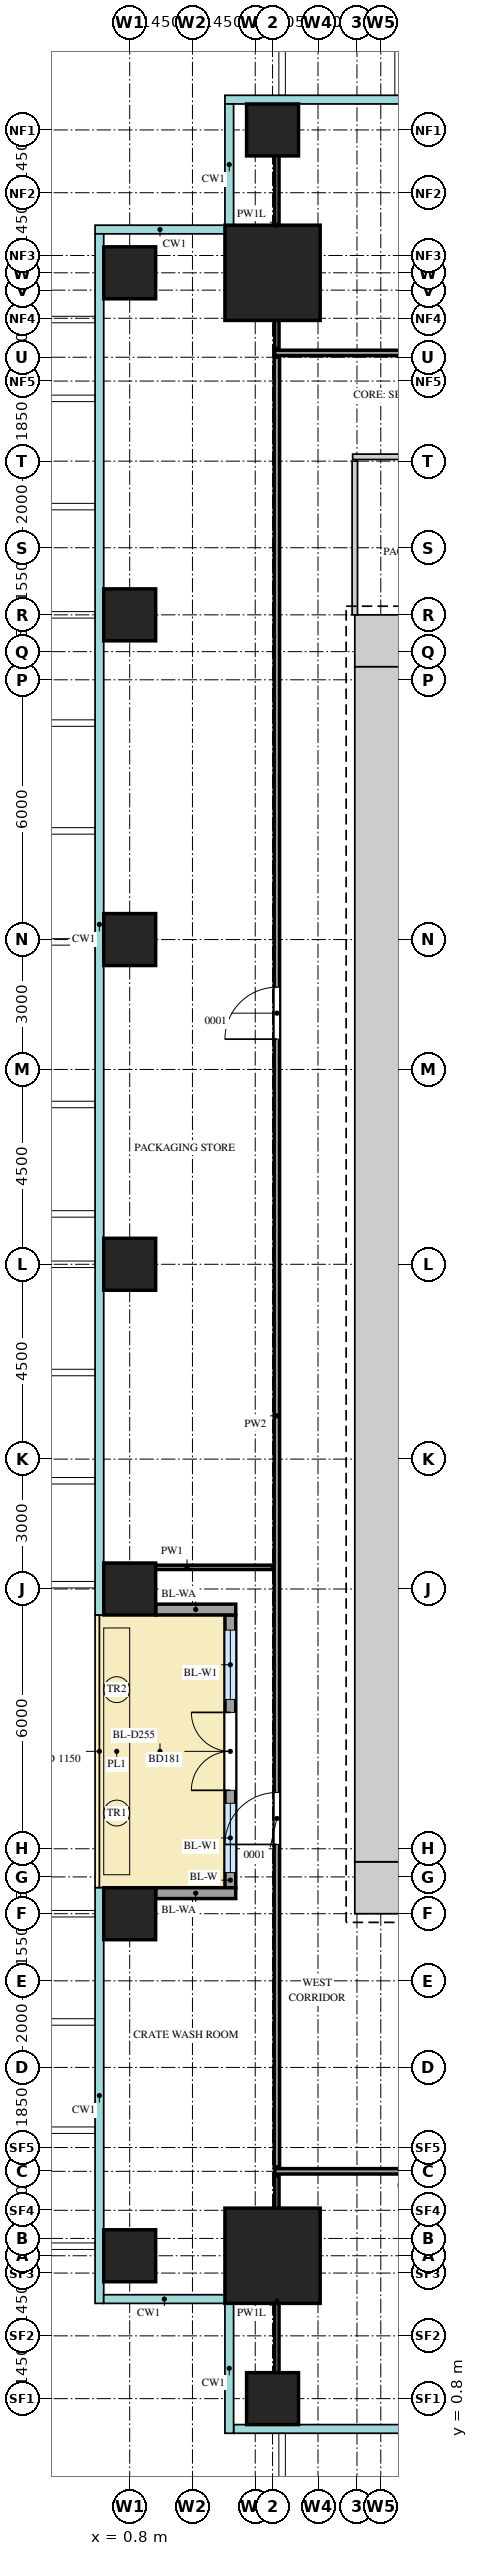
"""IFC4 building model, lengths in metres.
Left out: names, types, materials, properties, quantities, classifications, styles, units other than length and angle.
Written with IfcOpenShell. Run it as: python <this file> out.ifc"""

import sys

from ifc_helpers import new_model, si_unit, direction, frame, frame_2d, origin, origin_2d, place, context, subcontext, project, spatial, rectangle, extrude, source, transform, mapped, element, fill, save


model = new_model("IFC4")
c1 = context("Model", 3, precision=1e-05, world=origin(), true_north=direction((0.0, 1.0)))
c2 = subcontext(c1, "Body", "Model", "MODEL_VIEW")
j1 = project(units=[si_unit("LENGTHUNIT", "METRE"), si_unit("PLANEANGLEUNIT", "RADIAN")], contexts=[c1])
p1 = place(None, origin())
s1 = spatial("IfcSite", under=j1, at=p1, CompositionType="ELEMENT")
p2 = place(p1, origin())
s2 = spatial("IfcBuilding", under=s1, at=p2, CompositionType="ELEMENT")
p3 = place(p2, frame((0.0, 0.0, 87.0)))
s3 = spatial("IfcBuildingStorey", under=s2, at=p3, CompositionType="ELEMENT", Elevation=87.0)
m1 = source(origin(), c2, "Body", "SweptSolid", [
    extrude(rectangle(XDim=1.2, YDim=1.2, at=frame_2d((0.6, 0.0))), origin(), (0.0, 0.0, 1.0), 4.2),
])
for number, where, z_axis, x_axis in (
    (1, (6.0, 41.4, 0.0), (0.0, 0.0, 1.0), (1.0, 0.0, 0.0)),
    (2, (6.0, 12.6, 0.0), (0.0, 0.0, 1.0), (1.0, 0.0, 0.0)),
):
    element("IfcWall", number, at=place(p3, frame(where, z_axis=z_axis, x_axis=x_axis)), inside=s3, PredefinedType="SHEAR", context=c2, shape_type="MappedRepresentation", body=[
        mapped(m1, transform((0.0, 0.0, 0.0))),
    ])
m2 = source(origin(), c2, "Body", "SweptSolid", [
    extrude(rectangle(XDim=27.6, YDim=1.2, at=frame_2d((13.8, 0.0))), origin(), (0.0, 0.0, 1.0), 4.2),
])
p4 = place(p3, frame((6.6, 13.2, 0.0), z_axis=(0.0, 0.0, 1.0), x_axis=(0.0, 1.0, 0.0)))
e3 = element("IfcWall", 3, at=p4, inside=s3, PredefinedType="SHEAR", context=c2, shape_type="MappedRepresentation", body=[
    mapped(m2, transform((0.0, 0.0, 0.0))),
])
m3 = source(origin(), c2, "Body", "SweptSolid", [
    extrude(rectangle(XDim=2.2, YDim=2.2, at=origin_2d()), origin(), (0.0, 0.0, 1.0), 4.5),
])
for number, where, z_axis, x_axis in (
    (4, (4.1, 49.9, 0.0), (0.0, 0.0, 1.0), (1.0, 0.0, 0.0)),
    (5, (4.1, 4.1, 0.0), (0.0, 0.0, 1.0), (1.0, 0.0, 0.0)),
):
    element("IfcColumn", number, at=place(p3, frame(where, z_axis=z_axis, x_axis=x_axis)), inside=s3, PredefinedType="COLUMN", context=c2, shape_type="MappedRepresentation", body=[
        mapped(m3, transform((0.0, 0.0, 0.0))),
    ])
m4 = source(origin(), c2, "Body", "SweptSolid", [
    extrude(rectangle(XDim=1.2, YDim=1.2, at=origin_2d()), origin(), (0.0, 0.0, 1.0), 4.2),
])
for number, where, z_axis, x_axis in (
    (6, (4.1, 0.8, 0.0), (0.0, 0.0, 1.0), (1.0, 0.0, 0.0)),
    (7, (4.1, 53.2, 0.0), (0.0, 0.0, 1.0), (1.0, 0.0, 0.0)),
    (8, (0.8, 4.1, 0.0), (0.0, 0.0, 1.0), (1.0, 0.0, 0.0)),
    (9, (0.8, 12.0, 0.0), (0.0, 0.0, 1.0), (1.0, 0.0, 0.0)),
    (10, (0.8, 19.5, 0.0), (0.0, 0.0, 1.0), (1.0, 0.0, 0.0)),
    (11, (0.8, 27.0, 0.0), (0.0, 0.0, 1.0), (1.0, 0.0, 0.0)),
    (12, (0.8, 34.5, 0.0), (0.0, 0.0, 1.0), (1.0, 0.0, 0.0)),
    (13, (0.8, 42.0, 0.0), (0.0, 0.0, 1.0), (1.0, 0.0, 0.0)),
    (14, (0.8, 49.9, 0.0), (0.0, 0.0, 1.0), (1.0, 0.0, 0.0)),
):
    element("IfcColumn", number, at=place(p3, frame(where, z_axis=z_axis, x_axis=x_axis)), inside=s3, PredefinedType="COLUMN", context=c2, shape_type="MappedRepresentation", body=[
        mapped(m4, transform((0.0, 0.0, 0.0))),
    ])
m5 = source(origin(), c2, "Body", "SweptSolid", [
    extrude(rectangle(XDim=6.3, YDim=0.25, at=frame_2d((3.15, 0.0))), origin(), (0.0, 0.0, 1.0), 4.2),
])
p5 = place(p3, frame((3.125, 12.6, 0.0), z_axis=(0.0, 0.0, 1.0), x_axis=(0.0, 1.0, 0.0)))
e15 = element("IfcWall", 15, at=p5, inside=s3, PredefinedType="SOLIDWALL", context=c2, shape_type="MappedRepresentation", body=[
    mapped(m5, transform((0.0, 0.0, 0.0))),
])
m6 = source(origin(), c2, "Body", "SweptSolid", [
    extrude(rectangle(XDim=1.6, YDim=2.4, at=frame_2d((0.8, 1.2))), frame((0.0, 0.135, 0.0), z_axis=(0.0, -1.0, 0.0), x_axis=(1.0, 0.0, 0.0)), (0.0, 0.0, 1.0), 0.27),
])
p6 = place(p5, frame((0.35, 0.0, 0.0)))
e16 = element("IfcOpeningElement", 16, at=p6, cuts=e15, PredefinedType="OPENING", context=c2, shape_type="MappedRepresentation", body=[
    mapped(m6, transform((0.0, 0.0, 0.0))),
])
p7 = place(p5, frame((4.35, 0.0, 0.0)))
e17 = element("IfcOpeningElement", 17, at=p7, cuts=e15, PredefinedType="OPENING", context=c2, shape_type="MappedRepresentation", body=[
    mapped(m6, transform((0.0, 0.0, 0.0))),
])
m7 = source(origin(), c2, "Body", "SweptSolid", [
    extrude(rectangle(XDim=1.8, YDim=2.4, at=frame_2d((0.9, 1.2))), frame((0.0, 0.135, 0.0), z_axis=(0.0, -1.0, 0.0), x_axis=(1.0, 0.0, 0.0)), (0.0, 0.0, 1.0), 0.27),
])
p8 = place(p5, frame((2.25, 0.0, 0.0)))
e18 = element("IfcOpeningElement", 18, at=p8, cuts=e15, PredefinedType="OPENING", context=c2, shape_type="MappedRepresentation", body=[
    mapped(m7, transform((0.0, 0.0, 0.0))),
])
m8 = source(origin(), c2, "Body", "SweptSolid", [
    extrude(rectangle(XDim=1.85, YDim=0.25, at=frame_2d((0.925, 0.0))), origin(), (0.0, 0.0, 1.0), 3.9),
])
for number, where, z_axis, x_axis in (
    (19, (1.4, 12.475, 0.0), (0.0, 0.0, 1.0), (1.0, 0.0, 0.0)),
    (20, (1.4, 19.025, 0.0), (0.0, 0.0, 1.0), (1.0, 0.0, 0.0)),
):
    element("IfcWall", number, at=place(p3, frame(where, z_axis=z_axis, x_axis=x_axis)), inside=s3, PredefinedType="SOLIDWALL", context=c2, shape_type="MappedRepresentation", body=[
        mapped(m8, transform((0.0, 0.0, 0.0))),
    ])
m9 = source(origin(), c2, "Body", "SweptSolid", [
    extrude(rectangle(XDim=5.8, YDim=0.1, at=frame_2d((2.9, 0.0))), origin(), (0.0, 0.0, 1.0), 3.6),
])
p9 = place(p3, frame((4.2, 0.15, 0.0), z_axis=(0.0, 0.0, 1.0), x_axis=(0.0, 1.0, 0.0)))
e21 = element("IfcWall", 21, at=p9, inside=s3, PredefinedType="PARTITIONING", context=c2, shape_type="MappedRepresentation", body=[
    mapped(m9, transform((0.0, 0.0, 0.0))),
])
m10 = source(origin(), c2, "Body", "SweptSolid", [
    extrude(rectangle(XDim=22.3, YDim=0.125, at=frame_2d((11.15, 0.0))), origin(), (0.0, 0.0, 1.0), 4.3),
])
p10 = place(p3, frame((4.15, 6.05, 0.0), z_axis=(0.0, 0.0, 1.0), x_axis=(1.0, 0.0, 0.0)))
e22 = element("IfcWall", 22, at=p10, inside=s3, PredefinedType="PARTITIONING", context=c2, shape_type="MappedRepresentation", body=[
    mapped(m10, transform((0.0, 0.0, 0.0))),
])
m11 = source(origin(), c2, "Body", "SweptSolid", [
    extrude(rectangle(XDim=0.9, YDim=2.1, at=frame_2d((0.45, 1.05))), frame((0.0, 0.073, 0.0), z_axis=(0.0, -1.0, 0.0), x_axis=(1.0, 0.0, 0.0)), (0.0, 0.0, 1.0), 0.145),
])
p11 = place(p10, frame((3.5, 0.0, 0.0)))
e23 = element("IfcOpeningElement", 23, at=p11, cuts=e22, PredefinedType="OPENING", context=c2, shape_type="MappedRepresentation", body=[
    mapped(m11, transform((0.0, 0.0, 0.0))),
])
p12 = place(p10, frame((13.25, 0.0, 0.0)))
e24 = element("IfcOpeningElement", 24, at=p12, cuts=e22, PredefinedType="OPENING", context=c2, shape_type="MappedRepresentation", body=[
    mapped(m11, transform((0.0, 0.0, 0.0))),
])
m12 = source(origin(), c2, "Body", "SweptSolid", [
    extrude(rectangle(XDim=41.8, YDim=0.125, at=frame_2d((20.9, 0.0))), origin(), (0.0, 0.0, 1.0), 4.3),
])
p13 = place(p3, frame((4.2, 6.15, 0.0), z_axis=(0.0, 0.0, 1.0), x_axis=(0.0, 1.0, 0.0)))
e25 = element("IfcWall", 25, at=p13, inside=s3, PredefinedType="PARTITIONING", context=c2, shape_type="MappedRepresentation", body=[
    mapped(m12, transform((0.0, 0.0, 0.0))),
])
m13 = source(origin(), c2, "Body", "SweptSolid", [
    extrude(rectangle(XDim=1.2, YDim=2.1, at=frame_2d((0.6, 1.05))), frame((0.0, 0.073, 0.0), z_axis=(0.0, -1.0, 0.0), x_axis=(1.0, 0.0, 0.0)), (0.0, 0.0, 1.0), 0.145),
])
p14 = place(p13, frame((7.45, 0.0, 0.0)))
e26 = element("IfcOpeningElement", 26, at=p14, cuts=e25, PredefinedType="OPENING", context=c2, shape_type="MappedRepresentation", body=[
    mapped(m13, transform((0.0, 0.0, 0.0))),
])
p15 = place(p13, frame((26.05, 0.0, 0.0)))
e27 = element("IfcOpeningElement", 27, at=p15, cuts=e25, PredefinedType="OPENING", context=c2, shape_type="MappedRepresentation", body=[
    mapped(m13, transform((0.0, 0.0, 0.0))),
])
m14 = source(origin(), c2, "Body", "SweptSolid", [
    extrude(rectangle(XDim=3.95, YDim=0.1, at=frame_2d((1.975, 0.0))), origin(), (0.0, 0.0, 1.0), 4.3),
])
p16 = place(p3, frame((0.15, 20.0, 0.0), z_axis=(0.0, 0.0, 1.0), x_axis=(1.0, 0.0, 0.0)))
e28 = element("IfcWall", 28, at=p16, inside=s3, PredefinedType="PARTITIONING", context=c2, shape_type="MappedRepresentation", body=[
    mapped(m14, transform((0.0, 0.0, 0.0))),
])
m15 = source(origin(), c2, "Body", "SweptSolid", [
    extrude(rectangle(XDim=3.55, YDim=0.125, at=frame_2d((1.775, 0.0))), origin(), (0.0, 0.0, 1.0), 4.3),
])
p17 = place(p3, frame((6.0, 42.0, 0.0), z_axis=(0.0, 0.0, 1.0), x_axis=(0.0, 1.0, 0.0)))
e29 = element("IfcWall", 29, at=p17, inside=s3, PredefinedType="PARTITIONING", context=c2, shape_type="MappedRepresentation", body=[
    mapped(m15, transform((0.0, 0.0, 0.0))),
])
m16 = source(origin(), c2, "Body", "SweptSolid", [
    extrude(rectangle(XDim=7.95, YDim=0.125, at=frame_2d((3.975, 0.0))), origin(), (0.0, 0.0, 1.0), 4.3),
])
p18 = place(p3, frame((5.95, 45.65, 0.0), z_axis=(0.0, 0.0, 1.0), x_axis=(1.0, 0.0, 0.0)))
e30 = element("IfcWall", 30, at=p18, inside=s3, PredefinedType="PARTITIONING", context=c2, shape_type="MappedRepresentation", body=[
    mapped(m16, transform((0.0, 0.0, 0.0))),
])
p19 = place(p18, frame((1.55, 0.0, 0.0)))
e31 = element("IfcOpeningElement", 31, at=p19, cuts=e30, PredefinedType="OPENING", context=c2, shape_type="MappedRepresentation", body=[
    mapped(m11, transform((0.0, 0.0, 0.0))),
])
p20 = place(p18, frame((5.65, 0.0, 0.0)))
e32 = element("IfcOpeningElement", 32, at=p20, cuts=e30, PredefinedType="OPENING", context=c2, shape_type="MappedRepresentation", body=[
    mapped(m11, transform((0.0, 0.0, 0.0))),
])
m17 = source(origin(), c2, "Body", "SweptSolid", [
    extrude(rectangle(XDim=26.6, YDim=0.125, at=frame_2d((13.3, 0.0))), origin(), (0.0, 0.0, 1.0), 4.3),
])
p21 = place(p3, frame((4.15, 48.05, 0.0), z_axis=(0.0, 0.0, 1.0), x_axis=(1.0, 0.0, 0.0)))
e33 = element("IfcWall", 33, at=p21, inside=s3, PredefinedType="PARTITIONING", context=c2, shape_type="MappedRepresentation", body=[
    mapped(m17, transform((0.0, 0.0, 0.0))),
])
p22 = place(p21, frame((7.25, 0.0, 0.0)))
e34 = element("IfcOpeningElement", 34, at=p22, cuts=e33, PredefinedType="OPENING", context=c2, shape_type="MappedRepresentation", body=[
    mapped(m11, transform((0.0, 0.0, 0.0))),
])
p23 = place(p21, frame((20.5, 0.0, 0.0)))
e35 = element("IfcOpeningElement", 35, at=p23, cuts=e33, PredefinedType="OPENING", context=c2, shape_type="MappedRepresentation", body=[
    mapped(m11, transform((0.0, 0.0, 0.0))),
])
m18 = source(origin(), c2, "Body", "SweptSolid", [
    extrude(rectangle(XDim=5.7, YDim=0.1, at=frame_2d((2.85, 0.0))), origin(), (0.0, 0.0, 1.0), 3.6),
])
p24 = place(p3, frame((4.2, 48.15, 0.0), z_axis=(0.0, 0.0, 1.0), x_axis=(0.0, 1.0, 0.0)))
e36 = element("IfcWall", 36, at=p24, inside=s3, PredefinedType="PARTITIONING", context=c2, shape_type="MappedRepresentation", body=[
    mapped(m18, transform((0.0, 0.0, 0.0))),
])
m19 = source(origin(), c2, "Body", "SweptSolid", [
    extrude(rectangle(XDim=1.6, YDim=2.4, at=frame_2d((0.8, 1.2))), frame((0.0, 0.03, 0.0), z_axis=(0.0, -1.0, 0.0), x_axis=(1.0, 0.0, 0.0)), (0.0, 0.0, 1.0), 0.06),
])
p25 = place(p6, origin())
e37 = element("IfcWindow", 37, at=p25, inside=s3, PartitioningType="SINGLE_PANEL", PredefinedType="WINDOW", context=c2, shape_type="MappedRepresentation", body=[
    mapped(m19, transform((0.0, 0.0, 0.0))),
])
fill(e16, e37)
p26 = place(p7, origin())
e38 = element("IfcWindow", 38, at=p26, inside=s3, PartitioningType="SINGLE_PANEL", PredefinedType="WINDOW", context=c2, shape_type="MappedRepresentation", body=[
    mapped(m19, transform((0.0, 0.0, 0.0))),
])
fill(e17, e38)
m20 = source(origin(), c2, "Body", "SweptSolid", [
    extrude(rectangle(XDim=1.8, YDim=2.4, at=frame_2d((0.9, 1.2))), frame((0.0, 0.025, 0.0), z_axis=(0.0, -1.0, 0.0), x_axis=(1.0, 0.0, 0.0)), (0.0, 0.0, 1.0), 0.05),
])
p27 = place(p8, origin())
e39 = element("IfcDoor", 39, at=p27, inside=s3, OperationType="DOUBLE_DOOR_DOUBLE_SWING", PredefinedType="DOOR", context=c2, shape_type="MappedRepresentation", body=[
    mapped(m20, transform((0.0, 0.0, 0.0))),
])
fill(e18, e39)
m21 = source(origin(), c2, "Body", "SweptSolid", [
    extrude(rectangle(XDim=1.2, YDim=2.1, at=frame_2d((0.6, 1.05))), frame((0.0, 0.025, 0.0), z_axis=(0.0, -1.0, 0.0), x_axis=(1.0, 0.0, 0.0)), (0.0, 0.0, 1.0), 0.05),
])
p28 = place(p14, origin())
e40 = element("IfcDoor", 40, at=p28, inside=s3, OperationType="SINGLE_SWING_RIGHT", PredefinedType="DOOR", context=c2, shape_type="MappedRepresentation", body=[
    mapped(m21, transform((0.0, 0.0, 0.0))),
])
fill(e26, e40)
p29 = place(p15, origin())
e41 = element("IfcDoor", 41, at=p29, inside=s3, OperationType="SINGLE_SWING_RIGHT", PredefinedType="DOOR", context=c2, shape_type="MappedRepresentation", body=[
    mapped(m21, transform((0.0, 0.0, 0.0))),
])
fill(e27, e41)
save(model, sys.argv[1])
